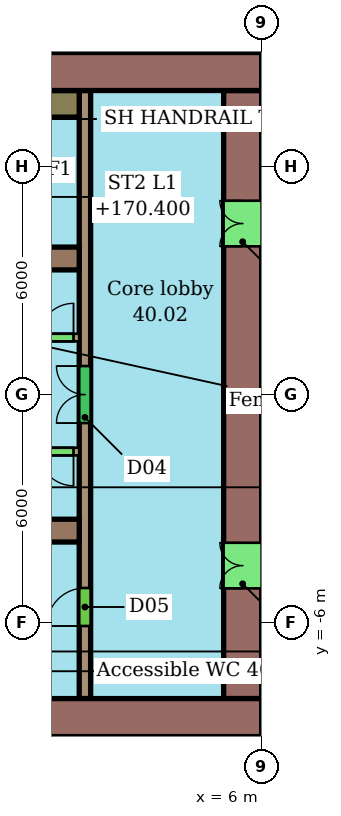
"""IFC4 building model, lengths in metres.
Left out: names, types, materials, properties, quantities, classifications, styles, units other than length and angle.
Written with IfcOpenShell. Run it as: python <this file> out.ifc"""

import sys

from ifc_helpers import new_model, si_unit, direction, frame, frame_2d, origin, place, context, subcontext, project, spatial, rectangle, extrude, element, fill, save


model = new_model("IFC4")
c1 = context("Model", 3, precision=1e-05, world=origin(), true_north=direction((0.0, 1.0)))
c2 = subcontext(c1, "Body", "Model", "MODEL_VIEW")
j1 = project(units=[si_unit("LENGTHUNIT", "METRE"), si_unit("PLANEANGLEUNIT", "RADIAN")], contexts=[c1])
p1 = place(None, origin())
s1 = spatial("IfcSite", under=j1, at=p1, CompositionType="ELEMENT")
p2 = place(p1, origin())
s2 = spatial("IfcBuilding", under=s1, at=p2, CompositionType="ELEMENT")
p3 = place(p2, frame((0.0, 0.0, 168.6)))
s3 = spatial("IfcBuildingStorey", under=s2, at=p3, CompositionType="ELEMENT", Elevation=168.6)
p4 = place(p3, frame((6.0, 8.5, 0.0), z_axis=(0.0, 0.0, 1.0), x_axis=(-1.0, 0.0, 0.0)))
e1 = element("IfcWall", 1, at=p4, inside=s3, PredefinedType="SHEAR", context=c2, shape_type="SweptSolid", body=[
    extrude(rectangle(XDim=12.0, YDim=1.0, at=frame_2d((6.0, 0.0))), origin(), (0.0, 0.0, 1.0), 3.3),
])
p5 = place(p4, frame((5.6, 0.0, 0.0)))
e2 = element("IfcOpeningElement", 2, at=p5, cuts=e1, PredefinedType="OPENING", context=c2, shape_type="SweptSolid", body=[
    extrude(rectangle(XDim=1.2, YDim=2.1, at=frame_2d((0.6, 1.05))), frame((0.0, 0.51, 0.0), z_axis=(0.0, -1.0, 0.0), x_axis=(1.0, 0.0, 0.0)), (0.0, 0.0, 1.0), 1.02),
])
p6 = place(p3, frame((-18.0, -8.5, 0.0), z_axis=(0.0, 0.0, 1.0), x_axis=(1.0, 0.0, 0.0)))
e3 = element("IfcWall", 3, at=p6, inside=s3, PredefinedType="SHEAR", context=c2, shape_type="SweptSolid", body=[
    extrude(rectangle(XDim=24.0, YDim=1.0, at=frame_2d((12.0, 0.0))), origin(), (0.0, 0.0, 1.0), 3.3),
])
p7 = place(p6, frame((6.0, 0.0, 0.0)))
e4 = element("IfcOpeningElement", 4, at=p7, cuts=e3, PredefinedType="OPENING", context=c2, shape_type="SweptSolid", body=[
    extrude(rectangle(XDim=1.2, YDim=2.1, at=frame_2d((0.6, 1.05))), frame((0.0, 0.51, 0.0), z_axis=(0.0, -1.0, 0.0), x_axis=(1.0, 0.0, 0.0)), (0.0, 0.0, 1.0), 1.02),
])
p8 = place(p3, frame((5.5, -8.0, 0.0), z_axis=(0.0, 0.0, 1.0), x_axis=(0.0, 1.0, 0.0)))
e5 = element("IfcWall", 5, at=p8, inside=s3, PredefinedType="SHEAR", context=c2, shape_type="SweptSolid", body=[
    extrude(rectangle(XDim=16.0, YDim=1.0, at=frame_2d((8.0, 0.0))), origin(), (0.0, 0.0, 1.0), 3.3),
])
p9 = place(p8, frame((2.9, 0.0, 0.0)))
e6 = element("IfcOpeningElement", 6, at=p9, cuts=e5, PredefinedType="OPENING", context=c2, shape_type="SweptSolid", body=[
    extrude(rectangle(XDim=1.2, YDim=2.1, at=frame_2d((0.6, 1.05))), frame((0.0, 0.51, 0.0), z_axis=(0.0, -1.0, 0.0), x_axis=(1.0, 0.0, 0.0)), (0.0, 0.0, 1.0), 1.02),
])
p10 = place(p8, frame((11.9, 0.0, 0.0)))
e7 = element("IfcOpeningElement", 7, at=p10, cuts=e5, PredefinedType="OPENING", context=c2, shape_type="SweptSolid", body=[
    extrude(rectangle(XDim=1.2, YDim=2.1, at=frame_2d((0.6, 1.05))), frame((0.0, 0.51, 0.0), z_axis=(0.0, -1.0, 0.0), x_axis=(1.0, 0.0, 0.0)), (0.0, 0.0, 1.0), 1.02),
])
for number, where, z_axis, x_axis in (
    (8, (-6.0, 3.58, 0.0), (0.0, 0.0, 1.0), (1.0, 0.0, 0.0)),
    (9, (-6.0, -3.58, 0.0), (0.0, 0.0, 1.0), (1.0, 0.0, 0.0)),
):
    element("IfcWall", number, at=place(p3, frame(where, z_axis=z_axis, x_axis=x_axis)), inside=s3, PredefinedType="SHEAR", context=c2, shape_type="SweptSolid", body=[
        extrude(rectangle(XDim=7.2, YDim=0.6, at=frame_2d((3.6, 0.0))), origin(), (0.0, 0.0, 1.0), 3.3),
    ])
p11 = place(p3, frame((1.35, -8.0, 0.0), z_axis=(0.0, 0.0, 1.0), x_axis=(0.0, 1.0, 0.0)))
e10 = element("IfcWall", 10, at=p11, inside=s3, PredefinedType="SHEAR", context=c2, shape_type="SweptSolid", body=[
    extrude(rectangle(XDim=16.0, YDim=0.3, at=frame_2d((8.0, 0.0))), origin(), (0.0, 0.0, 1.0), 3.3),
])
p12 = place(p11, frame((1.91, 0.0, 0.0)))
e11 = element("IfcOpeningElement", 11, at=p12, cuts=e10, PredefinedType="OPENING", context=c2, shape_type="SweptSolid", body=[
    extrude(rectangle(XDim=1.0, YDim=2.1, at=frame_2d((0.5, 1.05))), frame((0.0, 0.16, 0.0), z_axis=(0.0, -1.0, 0.0), x_axis=(1.0, 0.0, 0.0)), (0.0, 0.0, 1.0), 0.32),
])
p13 = place(p11, frame((7.25, 0.0, 0.0)))
e12 = element("IfcOpeningElement", 12, at=p13, cuts=e10, PredefinedType="OPENING", context=c2, shape_type="SweptSolid", body=[
    extrude(rectangle(XDim=1.5, YDim=2.1, at=frame_2d((0.75, 1.05))), frame((0.0, 0.16, 0.0), z_axis=(0.0, -1.0, 0.0), x_axis=(1.0, 0.0, 0.0)), (0.0, 0.0, 1.0), 0.32),
])
p14 = place(p3, frame((-13.2, 1.5, 0.0), z_axis=(0.0, 0.0, 1.0), x_axis=(1.0, 0.0, 0.0)))
e13 = element("IfcWall", 13, at=p14, inside=s3, PredefinedType="SHEAR", context=c2, shape_type="SweptSolid", body=[
    extrude(rectangle(XDim=14.4, YDim=0.2, at=frame_2d((7.2, 0.0))), origin(), (0.0, 0.0, 1.0), 3.3),
])
p15 = place(p14, frame((0.546, 0.0, 0.0)))
e14 = element("IfcOpeningElement", 14, at=p15, cuts=e13, PredefinedType="OPENING", context=c2, shape_type="SweptSolid", body=[
    extrude(rectangle(XDim=1.1, YDim=2.1, at=frame_2d((0.55, 1.05))), frame((0.0, 0.11, 0.0), z_axis=(0.0, -1.0, 0.0), x_axis=(1.0, 0.0, 0.0)), (0.0, 0.0, 1.0), 0.22),
])
p16 = place(p14, frame((2.988, 0.0, 0.0)))
e15 = element("IfcOpeningElement", 15, at=p16, cuts=e13, PredefinedType="OPENING", context=c2, shape_type="SweptSolid", body=[
    extrude(rectangle(XDim=1.1, YDim=2.1, at=frame_2d((0.55, 1.05))), frame((0.0, 0.11, 0.0), z_axis=(0.0, -1.0, 0.0), x_axis=(1.0, 0.0, 0.0)), (0.0, 0.0, 1.0), 0.22),
])
p17 = place(p14, frame((5.429, 0.0, 0.0)))
e16 = element("IfcOpeningElement", 16, at=p17, cuts=e13, PredefinedType="OPENING", context=c2, shape_type="SweptSolid", body=[
    extrude(rectangle(XDim=1.1, YDim=2.1, at=frame_2d((0.55, 1.05))), frame((0.0, 0.11, 0.0), z_axis=(0.0, -1.0, 0.0), x_axis=(1.0, 0.0, 0.0)), (0.0, 0.0, 1.0), 0.22),
])
p18 = place(p14, frame((7.871, 0.0, 0.0)))
e17 = element("IfcOpeningElement", 17, at=p18, cuts=e13, PredefinedType="OPENING", context=c2, shape_type="SweptSolid", body=[
    extrude(rectangle(XDim=1.1, YDim=2.1, at=frame_2d((0.55, 1.05))), frame((0.0, 0.11, 0.0), z_axis=(0.0, -1.0, 0.0), x_axis=(1.0, 0.0, 0.0)), (0.0, 0.0, 1.0), 0.22),
])
p19 = place(p14, frame((13.35, 0.0, 0.0)))
e18 = element("IfcOpeningElement", 18, at=p19, cuts=e13, PredefinedType="OPENING", context=c2, shape_type="SweptSolid", body=[
    extrude(rectangle(XDim=0.9, YDim=2.1, at=frame_2d((0.45, 1.05))), frame((0.0, 0.11, 0.0), z_axis=(0.0, -1.0, 0.0), x_axis=(1.0, 0.0, 0.0)), (0.0, 0.0, 1.0), 0.22),
])
p20 = place(p3, frame((1.2, -1.5, 0.0), z_axis=(0.0, 0.0, 1.0), x_axis=(-1.0, 0.0, 0.0)))
e19 = element("IfcWall", 19, at=p20, inside=s3, PredefinedType="SHEAR", context=c2, shape_type="SweptSolid", body=[
    extrude(rectangle(XDim=14.4, YDim=0.2, at=frame_2d((7.2, 0.0))), origin(), (0.0, 0.0, 1.0), 3.3),
])
p21 = place(p20, frame((7.821, 0.0, 0.0)))
e20 = element("IfcOpeningElement", 20, at=p21, cuts=e19, PredefinedType="OPENING", context=c2, shape_type="SweptSolid", body=[
    extrude(rectangle(XDim=1.2, YDim=2.1, at=frame_2d((0.6, 1.05))), frame((0.0, 0.11, 0.0), z_axis=(0.0, -1.0, 0.0), x_axis=(1.0, 0.0, 0.0)), (0.0, 0.0, 1.0), 0.22),
])
p22 = place(p20, frame((0.15, 0.0, 0.0)))
e21 = element("IfcOpeningElement", 21, at=p22, cuts=e19, PredefinedType="OPENING", context=c2, shape_type="SweptSolid", body=[
    extrude(rectangle(XDim=0.9, YDim=2.1, at=frame_2d((0.45, 1.05))), frame((0.0, 0.11, 0.0), z_axis=(0.0, -1.0, 0.0), x_axis=(1.0, 0.0, 0.0)), (0.0, 0.0, 1.0), 0.22),
])
p23 = place(p3, frame((0.4, 7.65, 0.0), z_axis=(0.0, 0.0, 1.0), x_axis=(1.0, 0.0, 0.0)))
e22 = element("IfcWall", 22, at=p23, inside=s3, PredefinedType="SHEAR", context=c2, shape_type="SweptSolid", body=[
    extrude(rectangle(XDim=0.8, YDim=0.7, at=frame_2d((0.4, 0.0))), origin(), (0.0, 0.0, 1.0), 3.3),
])
p24 = place(p9, origin())
e23 = element("IfcDoor", 23, at=p24, inside=s3, OperationType="DOUBLE_DOOR_SINGLE_SWING", PredefinedType="NOTDEFINED", context=c2, shape_type="SweptSolid", body=[
    extrude(rectangle(XDim=1.2, YDim=2.1, at=frame_2d((0.6, 1.05))), frame((0.0, 0.025, 0.0), z_axis=(0.0, -1.0, 0.0), x_axis=(1.0, 0.0, 0.0)), (0.0, 0.0, 1.0), 0.05),
])
fill(e6, e23)
p25 = place(p10, origin())
e24 = element("IfcDoor", 24, at=p25, inside=s3, OperationType="DOUBLE_DOOR_SINGLE_SWING", PredefinedType="NOTDEFINED", context=c2, shape_type="SweptSolid", body=[
    extrude(rectangle(XDim=1.2, YDim=2.1, at=frame_2d((0.6, 1.05))), frame((0.0, 0.025, 0.0), z_axis=(0.0, -1.0, 0.0), x_axis=(1.0, 0.0, 0.0)), (0.0, 0.0, 1.0), 0.05),
])
fill(e7, e24)
p26 = place(p12, origin())
e25 = element("IfcDoor", 25, at=p26, inside=s3, OperationType="SINGLE_SWING_LEFT", PredefinedType="NOTDEFINED", context=c2, shape_type="SweptSolid", body=[
    extrude(rectangle(XDim=1.0, YDim=2.1, at=frame_2d((0.5, 1.05))), frame((0.0, 0.025, 0.0), z_axis=(0.0, -1.0, 0.0), x_axis=(1.0, 0.0, 0.0)), (0.0, 0.0, 1.0), 0.05),
])
fill(e11, e25)
p27 = place(p13, origin())
e26 = element("IfcDoor", 26, at=p27, inside=s3, OperationType="DOUBLE_DOOR_SINGLE_SWING", PredefinedType="NOTDEFINED", context=c2, shape_type="SweptSolid", body=[
    extrude(rectangle(XDim=1.5, YDim=2.1, at=frame_2d((0.75, 1.05))), frame((0.0, 0.025, 0.0), z_axis=(0.0, -1.0, 0.0), x_axis=(1.0, 0.0, 0.0)), (0.0, 0.0, 1.0), 0.05),
])
fill(e12, e26)
p28 = place(p19, origin())
e27 = element("IfcDoor", 27, at=p28, inside=s3, OperationType="SINGLE_SWING_RIGHT", PredefinedType="NOTDEFINED", context=c2, shape_type="SweptSolid", body=[
    extrude(rectangle(XDim=0.9, YDim=2.1, at=frame_2d((0.45, 1.05))), frame((0.0, 0.025, 0.0), z_axis=(0.0, -1.0, 0.0), x_axis=(1.0, 0.0, 0.0)), (0.0, 0.0, 1.0), 0.05),
])
fill(e18, e27)
p29 = place(p22, origin())
e28 = element("IfcDoor", 28, at=p29, inside=s3, OperationType="SINGLE_SWING_LEFT", PredefinedType="NOTDEFINED", context=c2, shape_type="SweptSolid", body=[
    extrude(rectangle(XDim=0.9, YDim=2.1, at=frame_2d((0.45, 1.05))), frame((0.0, 0.025, 0.0), z_axis=(0.0, -1.0, 0.0), x_axis=(1.0, 0.0, 0.0)), (0.0, 0.0, 1.0), 0.05),
])
fill(e21, e28)
save(model, sys.argv[1])
